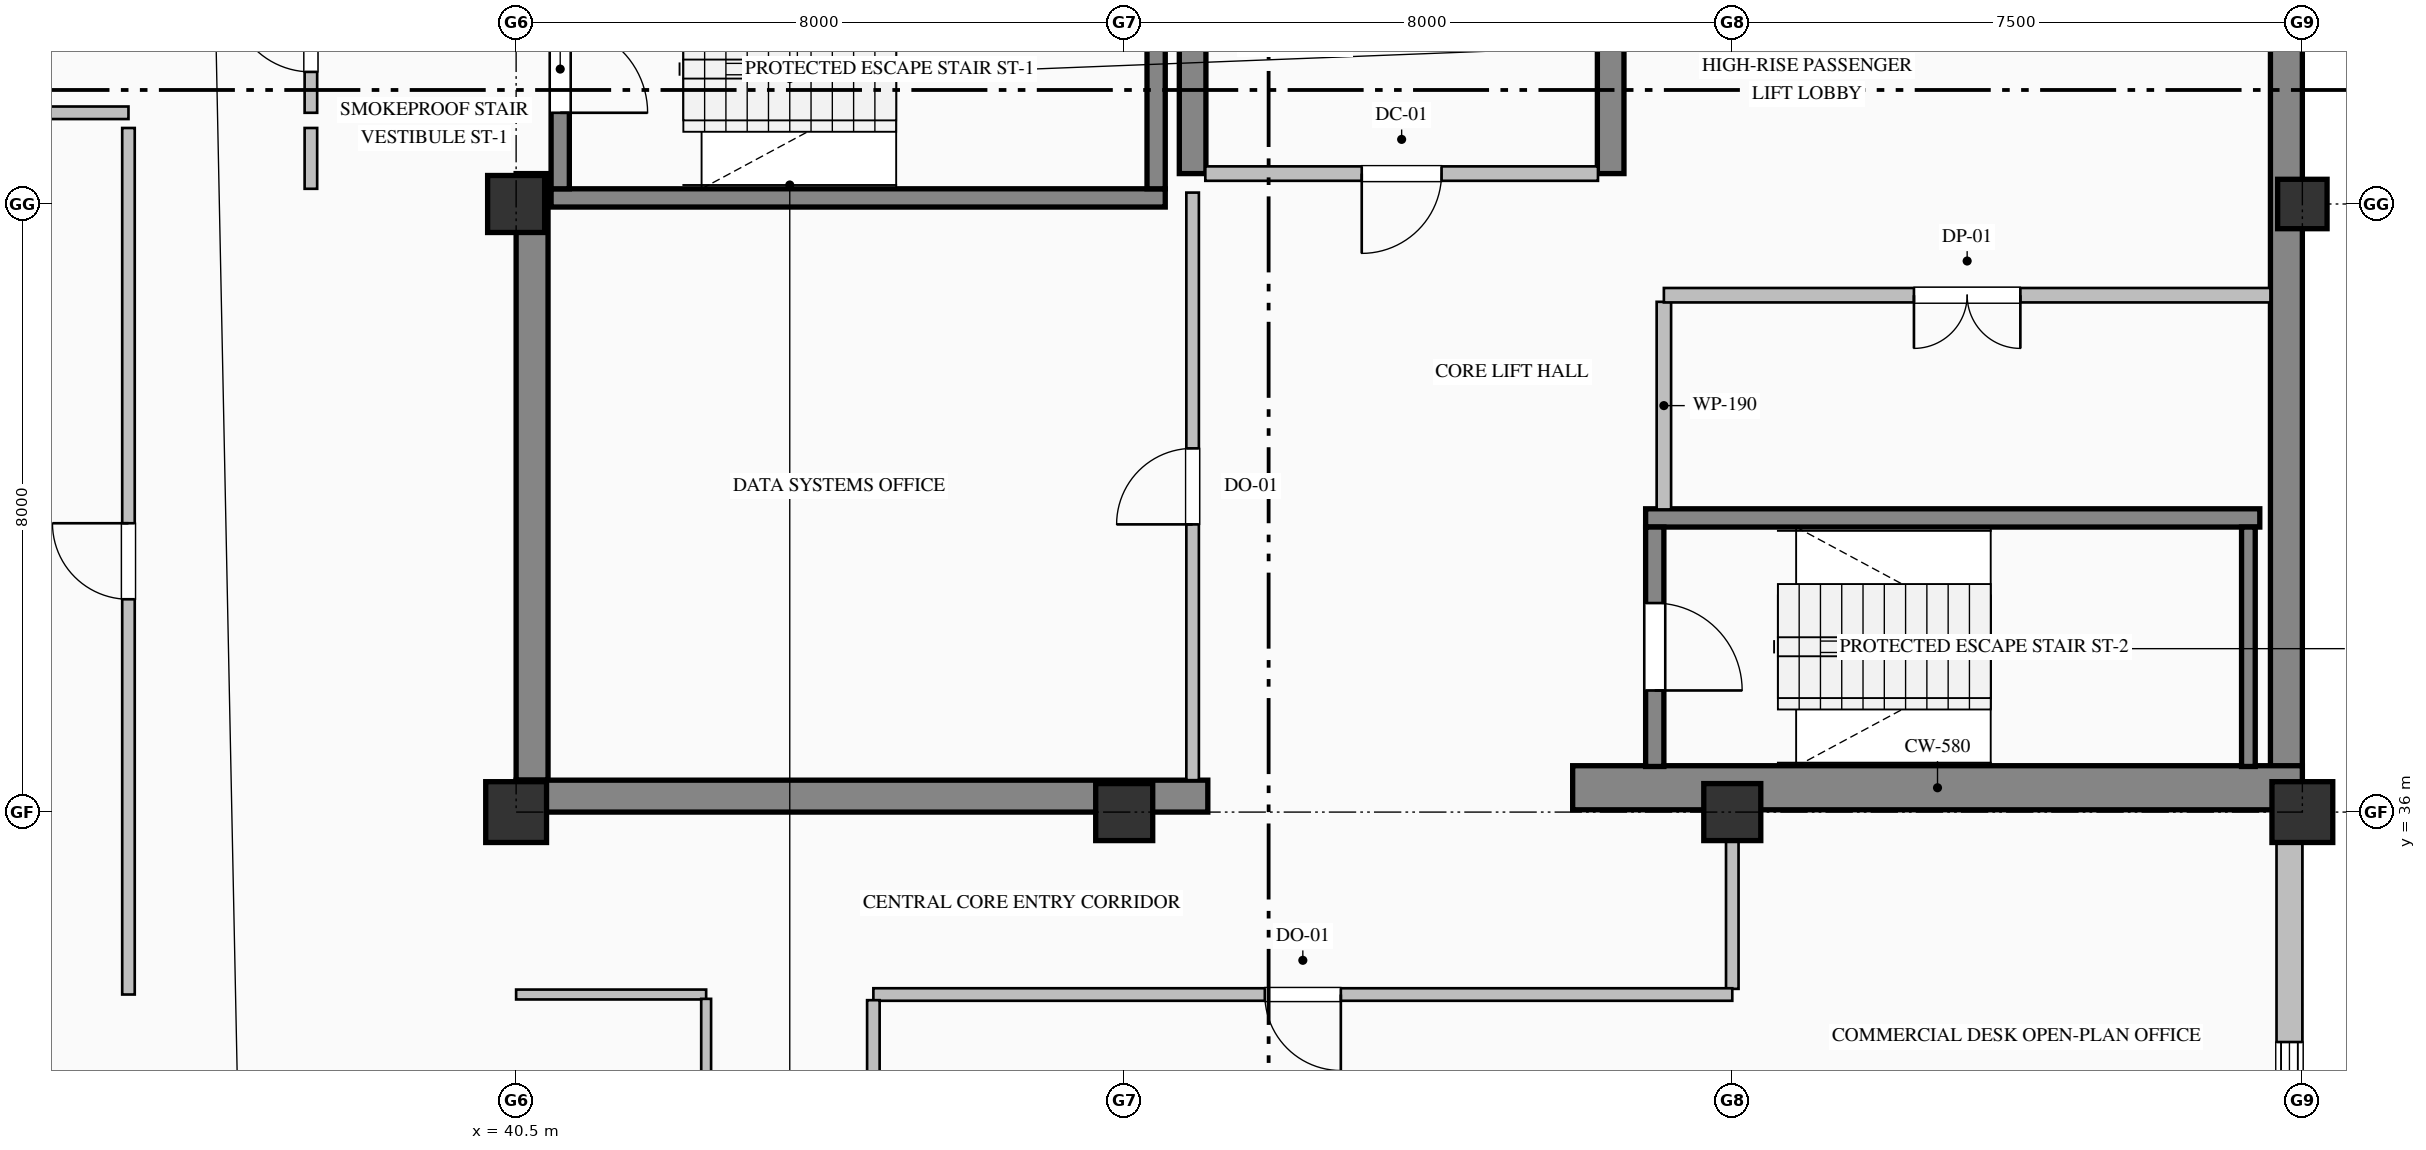
"""IFC4 building model, lengths in metres.
Left out: names, types, materials, properties, quantities, classifications, styles, units other than length and angle.
Written with IfcOpenShell. Run it as: python <this file> out.ifc"""

import sys

from ifc_helpers import new_model, si_unit, direction, frame, frame_2d, origin, origin_2d, place, context, subcontext, project, spatial, rectangle, hollow_rectangle, extrude, element, fill, save


model = new_model("IFC4")
c1 = context("Model", 3, precision=1e-05, world=origin(), true_north=direction((0.0, 1.0)))
c2 = subcontext(c1, "Body", "Model", "MODEL_VIEW")
j1 = project(units=[si_unit("LENGTHUNIT", "METRE"), si_unit("PLANEANGLEUNIT", "RADIAN")], contexts=[c1])
p1 = place(None, origin())
s1 = spatial("IfcSite", under=j1, at=p1, CompositionType="ELEMENT")
p2 = place(p1, origin())
s2 = spatial("IfcBuilding", under=s1, at=p2, CompositionType="ELEMENT")
p3 = place(p2, frame((0.0, 0.0, 351.2)))
s3 = spatial("IfcBuildingStorey", under=s2, at=p3, CompositionType="ELEMENT", Elevation=351.2)
p4 = place(p3, frame((63.79, 36.32, 0.0), z_axis=(0.0, 0.0, 1.0), x_axis=(0.0, 1.0, 0.0)))
e1 = element("IfcWall", 1, at=p4, inside=s3, PredefinedType="SHEAR", context=c2, shape_type="SweptSolid", body=[
    extrude(rectangle(XDim=15.26, YDim=0.42, at=frame_2d((7.63, 0.0))), origin(), (0.0, 0.0, 1.0), 3.785),
])
p5 = place(p3, frame((40.71, 36.42, 0.0), z_axis=(0.0, 0.0, 1.0), x_axis=(0.0, 1.0, 0.0)))
e2 = element("IfcWall", 2, at=p5, inside=s3, PredefinedType="SHEAR", context=c2, shape_type="SweptSolid", body=[
    extrude(rectangle(XDim=7.98, YDim=0.42, at=frame_2d((3.99, 0.0))), origin(), (0.0, 0.0, 1.0), 3.785),
])
p6 = place(p3, frame((40.5, 36.21, 0.0), z_axis=(0.0, 0.0, 1.0), x_axis=(1.0, 0.0, 0.0)))
e3 = element("IfcWall", 3, at=p6, inside=s3, PredefinedType="SHEAR", context=c2, shape_type="SweptSolid", body=[
    extrude(rectangle(XDim=9.1, YDim=0.42, at=frame_2d((4.55, 0.0))), origin(), (0.0, 0.0, 1.0), 3.785),
])
p7 = place(p3, frame((54.4, 36.32, 0.0), z_axis=(0.0, 0.0, 1.0), x_axis=(1.0, 0.0, 0.0)))
e4 = element("IfcWall", 4, at=p7, inside=s3, PredefinedType="SHEAR", context=c2, shape_type="SweptSolid", body=[
    extrude(rectangle(XDim=9.6, YDim=0.58, at=frame_2d((4.8, 0.0))), origin(), (0.0, 0.0, 1.0), 4.0),
])
p8 = place(p3, frame((49.4, 44.4, 0.0), z_axis=(0.0, 0.0, 1.0), x_axis=(0.0, 1.0, 0.0)))
e5 = element("IfcWall", 5, at=p8, inside=s3, PredefinedType="SHEAR", context=c2, shape_type="SweptSolid", body=[
    extrude(rectangle(XDim=3.0, YDim=0.35, at=frame_2d((1.5, 0.0))), origin(), (0.0, 0.0, 1.0), 3.785),
])
p9 = place(p3, frame((54.9, 44.4, 0.0), z_axis=(0.0, 0.0, 1.0), x_axis=(0.0, 1.0, 0.0)))
e6 = element("IfcWall", 6, at=p9, inside=s3, PredefinedType="SHEAR", context=c2, shape_type="SweptSolid", body=[
    extrude(rectangle(XDim=7.18, YDim=0.35, at=frame_2d((3.59, 0.0))), origin(), (0.0, 0.0, 1.0), 3.785),
])
p10 = place(p3, frame((40.5, 36.0, 0.0), z_axis=(0.0, 0.0, 1.0), x_axis=(1.0, 0.0, 0.0)))
e7 = element("IfcColumn", 7, at=p10, inside=s3, PredefinedType="COLUMN", context=c2, shape_type="SweptSolid", body=[
    extrude(hollow_rectangle(XDim=0.8, YDim=0.8, WallThickness=0.032, at=origin_2d()), origin(), (0.0, 0.0, 1.0), 4.0),
])
for number, where, z_axis, x_axis in (
    (8, (40.5, 44.0, 0.0), (0.0, 0.0, 1.0), (1.0, 0.0, 0.0)),
    (9, (48.5, 36.0, 0.0), (0.0, 0.0, 1.0), (1.0, 0.0, 0.0)),
    (10, (56.5, 36.0, 0.0), (0.0, 0.0, 1.0), (1.0, 0.0, 0.0)),
):
    element("IfcColumn", number, at=place(p3, frame(where, z_axis=z_axis, x_axis=x_axis)), inside=s3, PredefinedType="COLUMN", context=c2, shape_type="SweptSolid", body=[
        extrude(rectangle(XDim=0.75, YDim=0.75, at=origin_2d()), origin(), (0.0, 0.0, 1.0), 4.0),
    ])
p11 = place(p3, frame((64.0, 36.0, 0.0), z_axis=(0.0, 0.0, 1.0), x_axis=(1.0, 0.0, 0.0)))
e11 = element("IfcColumn", 11, at=p11, inside=s3, PredefinedType="COLUMN", context=c2, shape_type="SweptSolid", body=[
    extrude(hollow_rectangle(XDim=0.8, YDim=0.8, WallThickness=0.032, at=origin_2d()), origin(), (0.0, 0.0, 1.0), 4.0),
])
p12 = place(p3, frame((64.0, 44.0, 0.0), z_axis=(0.0, 0.0, 1.0), x_axis=(1.0, 0.0, 0.0)))
e12 = element("IfcColumn", 12, at=p12, inside=s3, PredefinedType="COLUMN", context=c2, shape_type="SweptSolid", body=[
    extrude(hollow_rectangle(XDim=0.65, YDim=0.65, WallThickness=0.028, at=origin_2d()), origin(), (0.0, 0.0, 1.0), 4.0),
])
p13 = place(p3, frame((63.83, 36.05, 0.0), z_axis=(0.0, 0.0, 1.0), x_axis=(0.0, -1.0, 0.0)))
e13 = element("IfcWall", 13, at=p13, inside=s3, PredefinedType="SOLIDWALL", context=c2, shape_type="SweptSolid", body=[
    extrude(rectangle(XDim=13.55, YDim=0.34, at=frame_2d((6.775, 0.0))), origin(), (0.0, 0.0, 1.0), 3.335),
])
p14 = place(p13, frame((3.075, 0.0, 0.8)))
e14 = element("IfcOpeningElement", 14, at=p14, cuts=e13, PredefinedType="OPENING", context=c2, shape_type="SweptSolid", body=[
    extrude(rectangle(XDim=1.05, YDim=2.15, at=frame_2d((0.525, 1.075))), frame((0.0, 0.18, 0.0), z_axis=(0.0, -1.0, 0.0), x_axis=(1.0, 0.0, 0.0)), (0.0, 0.0, 1.0), 0.36),
])
p15 = place(p3, frame((49.04, 44.08, 0.0), z_axis=(0.0, 0.0, 1.0), x_axis=(-1.0, 0.0, 0.0)))
e15 = element("IfcWall", 15, at=p15, inside=s3, PredefinedType="SOLIDWALL", context=c2, shape_type="SweptSolid", body=[
    extrude(rectangle(XDim=8.08, YDim=0.24, at=frame_2d((4.04, 0.0))), origin(), (0.0, 0.0, 1.0), 4.0),
])
p16 = place(p3, frame((41.08, 47.35, 0.0), z_axis=(0.0, 0.0, 1.0), x_axis=(0.0, -1.0, 0.0)))
e16 = element("IfcWall", 16, at=p16, inside=s3, PredefinedType="SOLIDWALL", context=c2, shape_type="SweptSolid", body=[
    extrude(rectangle(XDim=3.15, YDim=0.24, at=frame_2d((1.575, 0.0))), origin(), (0.0, 0.0, 1.0), 4.0),
])
p17 = place(p16, frame((1.0, 0.0, 0.0)))
e17 = element("IfcOpeningElement", 17, at=p17, cuts=e16, PredefinedType="OPENING", context=c2, shape_type="SweptSolid", body=[
    extrude(rectangle(XDim=1.15, YDim=2.2, at=frame_2d((0.575, 1.1))), frame((0.0, 0.13, 0.0), z_axis=(0.0, -1.0, 0.0), x_axis=(1.0, 0.0, 0.0)), (0.0, 0.0, 1.0), 0.26),
])
p18 = place(p3, frame((48.92, 44.2, 0.0), z_axis=(0.0, 0.0, 1.0), x_axis=(0.0, 1.0, 0.0)))
e18 = element("IfcWall", 18, at=p18, inside=s3, PredefinedType="SOLIDWALL", context=c2, shape_type="SweptSolid", body=[
    extrude(rectangle(XDim=3.15, YDim=0.24, at=frame_2d((1.575, 0.0))), origin(), (0.0, 0.0, 1.0), 4.0),
])
p19 = place(p3, frame((55.36, 39.87, 0.0), z_axis=(0.0, 0.0, 1.0), x_axis=(1.0, 0.0, 0.0)))
e19 = element("IfcWall", 19, at=p19, inside=s3, PredefinedType="SOLIDWALL", context=c2, shape_type="SweptSolid", body=[
    extrude(rectangle(XDim=8.08, YDim=0.24, at=frame_2d((4.04, 0.0))), origin(), (0.0, 0.0, 1.0), 4.0),
])
p20 = place(p3, frame((55.48, 39.75, 0.0), z_axis=(0.0, 0.0, 1.0), x_axis=(0.0, -1.0, 0.0)))
e20 = element("IfcWall", 20, at=p20, inside=s3, PredefinedType="SOLIDWALL", context=c2, shape_type="SweptSolid", body=[
    extrude(rectangle(XDim=3.15, YDim=0.24, at=frame_2d((1.575, 0.0))), origin(), (0.0, 0.0, 1.0), 4.0),
])
p21 = place(p20, frame((1.0, 0.0, 0.0)))
e21 = element("IfcOpeningElement", 21, at=p21, cuts=e20, PredefinedType="OPENING", context=c2, shape_type="SweptSolid", body=[
    extrude(rectangle(XDim=1.15, YDim=2.2, at=frame_2d((0.575, 1.1))), frame((0.0, 0.13, 0.0), z_axis=(0.0, -1.0, 0.0), x_axis=(1.0, 0.0, 0.0)), (0.0, 0.0, 1.0), 0.26),
])
p22 = place(p3, frame((63.29, 36.6, 0.0), z_axis=(0.0, 0.0, 1.0), x_axis=(0.0, 1.0, 0.0)))
e22 = element("IfcWall", 22, at=p22, inside=s3, PredefinedType="SOLIDWALL", context=c2, shape_type="SweptSolid", body=[
    extrude(rectangle(XDim=3.15, YDim=0.18, at=frame_2d((1.575, 0.0))), origin(), (0.0, 0.0, 1.0), 4.0),
])
p23 = place(p3, frame((37.8, 45.2, 0.0), z_axis=(0.0, 0.0, 1.0), x_axis=(0.0, 1.0, 0.0)))
e23 = element("IfcWall", 23, at=p23, inside=s3, PredefinedType="PARTITIONING", context=c2, shape_type="SweptSolid", body=[
    extrude(rectangle(XDim=2.125, YDim=0.165, at=frame_2d((1.063, 0.0))), origin(), (0.0, 0.0, 1.0), 3.785),
])
p24 = place(p23, frame((0.538, 0.0, 0.0)))
e24 = element("IfcOpeningElement", 24, at=p24, cuts=e23, PredefinedType="OPENING", context=c2, shape_type="SweptSolid", body=[
    extrude(rectangle(XDim=1.05, YDim=2.15, at=frame_2d((0.525, 1.075))), frame((0.0, 0.093, 0.0), z_axis=(0.0, -1.0, 0.0), x_axis=(1.0, 0.0, 0.0)), (0.0, 0.0, 1.0), 0.185),
])
p25 = place(p3, frame((37.8, 44.2, 0.0), z_axis=(0.0, 0.0, 1.0), x_axis=(0.0, 1.0, 0.0)))
e25 = element("IfcWall", 25, at=p25, inside=s3, PredefinedType="PARTITIONING", context=c2, shape_type="SweptSolid", body=[
    extrude(rectangle(XDim=0.8, YDim=0.165, at=frame_2d((0.4, 0.0))), origin(), (0.0, 0.0, 1.0), 3.785),
])
p26 = place(p3, frame((54.733, 44.4, 0.0), z_axis=(0.0, 0.0, 1.0), x_axis=(-1.0, 0.0, 0.0)))
e26 = element("IfcWall", 26, at=p26, inside=s3, PredefinedType="PARTITIONING", context=c2, shape_type="SweptSolid", body=[
    extrude(rectangle(XDim=5.166, YDim=0.19, at=frame_2d((2.583, 0.0))), origin(), (0.0, 0.0, 1.0), 3.785),
])
p27 = place(p26, frame((2.058, 0.0, 0.0)))
e27 = element("IfcOpeningElement", 27, at=p27, cuts=e26, PredefinedType="OPENING", context=c2, shape_type="SweptSolid", body=[
    extrude(rectangle(XDim=1.05, YDim=2.15, at=frame_2d((0.525, 1.075))), frame((0.0, 0.105, 0.0), z_axis=(0.0, -1.0, 0.0), x_axis=(1.0, 0.0, 0.0)), (0.0, 0.0, 1.0), 0.21),
])
p28 = place(p3, frame((49.4, 36.42, 0.0), z_axis=(0.0, 0.0, 1.0), x_axis=(0.0, 1.0, 0.0)))
e28 = element("IfcWall", 28, at=p28, inside=s3, PredefinedType="PARTITIONING", context=c2, shape_type="SweptSolid", body=[
    extrude(rectangle(XDim=7.73, YDim=0.165, at=frame_2d((3.865, 0.0))), origin(), (0.0, 0.0, 1.0), 3.027),
])
p29 = place(p28, frame((3.365, 0.0, 0.0)))
e29 = element("IfcOpeningElement", 29, at=p29, cuts=e28, PredefinedType="OPENING", context=c2, shape_type="SweptSolid", body=[
    extrude(rectangle(XDim=1.0, YDim=2.15, at=frame_2d((0.5, 1.075))), frame((0.0, 0.093, 0.0), z_axis=(0.0, -1.0, 0.0), x_axis=(1.0, 0.0, 0.0)), (0.0, 0.0, 1.0), 0.185),
])
p30 = place(p3, frame((55.6, 42.713, 0.0), z_axis=(0.0, 0.0, 1.0), x_axis=(0.0, -1.0, 0.0)))
e30 = element("IfcWall", 30, at=p30, inside=s3, PredefinedType="PARTITIONING", context=c2, shape_type="SweptSolid", body=[
    extrude(rectangle(XDim=2.731, YDim=0.19, at=frame_2d((1.365, 0.0))), origin(), (0.0, 0.0, 1.0), 3.785),
])
p31 = place(p3, frame((63.58, 42.8, 0.0), z_axis=(0.0, 0.0, 1.0), x_axis=(-1.0, 0.0, 0.0)))
e31 = element("IfcWall", 31, at=p31, inside=s3, PredefinedType="PARTITIONING", context=c2, shape_type="SweptSolid", body=[
    extrude(rectangle(XDim=7.98, YDim=0.19, at=frame_2d((3.99, 0.0))), origin(), (0.0, 0.0, 1.0), 3.785),
])
p32 = place(p31, frame((3.29, 0.0, 0.0)))
e32 = element("IfcOpeningElement", 32, at=p32, cuts=e31, PredefinedType="OPENING", context=c2, shape_type="SweptSolid", body=[
    extrude(rectangle(XDim=1.4, YDim=2.25, at=frame_2d((0.7, 1.125))), frame((0.0, 0.105, 0.0), z_axis=(0.0, -1.0, 0.0), x_axis=(1.0, 0.0, 0.0)), (0.0, 0.0, 1.0), 0.21),
])
p33 = place(p3, frame((35.4, 45.2, 0.0), z_axis=(0.0, 0.0, 1.0), x_axis=(-1.0, 0.0, 0.0)))
e33 = element("IfcWall", 33, at=p33, inside=s3, PredefinedType="PARTITIONING", context=c2, shape_type="SweptSolid", body=[
    extrude(rectangle(XDim=5.2, YDim=0.165, at=frame_2d((2.6, 0.0))), origin(), (0.0, 0.0, 1.0), 3.785),
])
p34 = place(p3, frame((35.4, 33.6, 0.0), z_axis=(0.0, 0.0, 1.0), x_axis=(0.0, 1.0, 0.0)))
e34 = element("IfcWall", 34, at=p34, inside=s3, PredefinedType="PARTITIONING", context=c2, shape_type="SweptSolid", body=[
    extrude(rectangle(XDim=11.4, YDim=0.165, at=frame_2d((5.7, 0.0))), origin(), (0.0, 0.0, 1.0), 3.785),
])
p35 = place(p34, frame((5.2, 0.0, 0.0)))
e35 = element("IfcOpeningElement", 35, at=p35, cuts=e34, PredefinedType="OPENING", context=c2, shape_type="SweptSolid", body=[
    extrude(rectangle(XDim=1.0, YDim=2.15, at=frame_2d((0.5, 1.075))), frame((0.0, 0.093, 0.0), z_axis=(0.0, -1.0, 0.0), x_axis=(1.0, 0.0, 0.0)), (0.0, 0.0, 1.0), 0.185),
])
p36 = place(p3, frame((56.5, 36.0, 0.0), z_axis=(0.0, 0.0, 1.0), x_axis=(0.0, -1.0, 0.0)))
e36 = element("IfcWall", 36, at=p36, inside=s3, PredefinedType="PARTITIONING", context=c2, shape_type="SweptSolid", body=[
    extrude(rectangle(XDim=2.325, YDim=0.165, at=frame_2d((1.163, 0.0))), origin(), (0.0, 0.0, 1.0), 3.177),
])
p37 = place(p3, frame((56.5, 33.6, 0.0), z_axis=(0.0, 0.0, 1.0), x_axis=(-1.0, 0.0, 0.0)))
e37 = element("IfcWall", 37, at=p37, inside=s3, PredefinedType="PARTITIONING", context=c2, shape_type="SweptSolid", body=[
    extrude(rectangle(XDim=11.3, YDim=0.165, at=frame_2d((5.65, 0.0))), origin(), (0.0, 0.0, 1.0), 3.785),
])
p38 = place(p37, frame((5.15, 0.0, 0.0)))
e38 = element("IfcOpeningElement", 38, at=p38, cuts=e37, PredefinedType="OPENING", context=c2, shape_type="SweptSolid", body=[
    extrude(rectangle(XDim=1.0, YDim=2.15, at=frame_2d((0.5, 1.075))), frame((0.0, 0.093, 0.0), z_axis=(0.0, -1.0, 0.0), x_axis=(1.0, 0.0, 0.0)), (0.0, 0.0, 1.0), 0.185),
])
p39 = place(p3, frame((43.0, 33.6, 0.0), z_axis=(0.0, 0.0, 1.0), x_axis=(-1.0, 0.0, 0.0)))
e39 = element("IfcWall", 39, at=p39, inside=s3, PredefinedType="PARTITIONING", context=c2, shape_type="SweptSolid", body=[
    extrude(rectangle(XDim=2.5, YDim=0.13, at=frame_2d((1.25, 0.0))), origin(), (0.0, 0.0, 1.0), 3.785),
])
p40 = place(p3, frame((45.2, 33.525, 0.0), z_axis=(0.0, 0.0, 1.0), x_axis=(0.0, -1.0, 0.0)))
e40 = element("IfcWall", 40, at=p40, inside=s3, PredefinedType="PARTITIONING", context=c2, shape_type="SweptSolid", body=[
    extrude(rectangle(XDim=3.528, YDim=0.165, at=frame_2d((1.764, 0.0))), origin(), (0.0, 0.0, 1.0), 3.785),
])
p41 = place(p3, frame((43.0, 22.875, 0.0), z_axis=(0.0, 0.0, 1.0), x_axis=(0.0, 1.0, 0.0)))
e41 = element("IfcWall", 41, at=p41, inside=s3, PredefinedType="PARTITIONING", context=c2, shape_type="SweptSolid", body=[
    extrude(rectangle(XDim=10.668, YDim=0.13, at=frame_2d((5.334, 0.0))), origin(), (0.0, 0.0, 1.0), 3.785),
])
p42 = place(p41, frame((4.834, 0.0, 0.0)))
e42 = element("IfcOpeningElement", 42, at=p42, cuts=e41, PredefinedType="OPENING", context=c2, shape_type="SweptSolid", body=[
    extrude(rectangle(XDim=1.0, YDim=2.15, at=frame_2d((0.5, 1.075))), frame((0.0, 0.075, 0.0), z_axis=(0.0, -1.0, 0.0), x_axis=(1.0, 0.0, 0.0)), (0.0, 0.0, 1.0), 0.15),
])
p43 = place(p14, origin())
e43 = element("IfcWindow", 43, at=p43, inside=s3, PartitioningType="SINGLE_PANEL", PredefinedType="WINDOW", context=c2, shape_type="SweptSolid", body=[
    extrude(rectangle(XDim=1.05, YDim=2.15, at=frame_2d((0.525, 1.075))), frame((0.0, 0.15, 0.0), z_axis=(0.0, -1.0, 0.0), x_axis=(1.0, 0.0, 0.0)), (0.0, 0.0, 1.0), 0.06),
])
fill(e14, e43)
p44 = place(p17, origin())
e44 = element("IfcDoor", 44, at=p44, inside=s3, OperationType="SINGLE_SWING_RIGHT", PredefinedType="DOOR", context=c2, shape_type="SweptSolid", body=[
    extrude(rectangle(XDim=1.15, YDim=2.2, at=frame_2d((0.575, 1.1))), frame((0.0, 0.025, 0.0), z_axis=(0.0, -1.0, 0.0), x_axis=(1.0, 0.0, 0.0)), (0.0, 0.0, 1.0), 0.05),
])
fill(e17, e44)
p45 = place(p21, origin())
e45 = element("IfcDoor", 45, at=p45, inside=s3, OperationType="SINGLE_SWING_RIGHT", PredefinedType="DOOR", context=c2, shape_type="SweptSolid", body=[
    extrude(rectangle(XDim=1.15, YDim=2.2, at=frame_2d((0.575, 1.1))), frame((0.0, 0.025, 0.0), z_axis=(0.0, -1.0, 0.0), x_axis=(1.0, 0.0, 0.0)), (0.0, 0.0, 1.0), 0.05),
])
fill(e21, e45)
p46 = place(p27, origin())
e46 = element("IfcDoor", 46, at=p46, inside=s3, OperationType="SINGLE_SWING_RIGHT", PredefinedType="DOOR", context=c2, shape_type="SweptSolid", body=[
    extrude(rectangle(XDim=1.05, YDim=2.15, at=frame_2d((0.525, 1.075))), frame((0.0, 0.025, 0.0), z_axis=(0.0, -1.0, 0.0), x_axis=(1.0, 0.0, 0.0)), (0.0, 0.0, 1.0), 0.05),
])
fill(e27, e46)
p47 = place(p24, origin())
e47 = element("IfcDoor", 47, at=p47, inside=s3, OperationType="SINGLE_SWING_RIGHT", PredefinedType="DOOR", context=c2, shape_type="SweptSolid", body=[
    extrude(rectangle(XDim=1.05, YDim=2.15, at=frame_2d((0.525, 1.075))), frame((0.0, 0.025, 0.0), z_axis=(0.0, -1.0, 0.0), x_axis=(1.0, 0.0, 0.0)), (0.0, 0.0, 1.0), 0.05),
])
fill(e24, e47)
p48 = place(p29, origin())
e48 = element("IfcDoor", 48, at=p48, inside=s3, OperationType="SINGLE_SWING_LEFT", PredefinedType="DOOR", context=c2, shape_type="SweptSolid", body=[
    extrude(rectangle(XDim=1.0, YDim=2.15, at=frame_2d((0.5, 1.075))), frame((0.0, 0.025, 0.0), z_axis=(0.0, -1.0, 0.0), x_axis=(1.0, 0.0, 0.0)), (0.0, 0.0, 1.0), 0.05),
])
fill(e29, e48)
p49 = place(p32, origin())
e49 = element("IfcDoor", 49, at=p49, inside=s3, OperationType="DOUBLE_DOOR_SINGLE_SWING", PredefinedType="DOOR", context=c2, shape_type="SweptSolid", body=[
    extrude(rectangle(XDim=1.4, YDim=2.25, at=frame_2d((0.7, 1.125))), frame((0.0, 0.025, 0.0), z_axis=(0.0, -1.0, 0.0), x_axis=(1.0, 0.0, 0.0)), (0.0, 0.0, 1.0), 0.05),
])
fill(e32, e49)
p50 = place(p38, origin())
e50 = element("IfcDoor", 50, at=p50, inside=s3, OperationType="SINGLE_SWING_LEFT", PredefinedType="DOOR", context=c2, shape_type="SweptSolid", body=[
    extrude(rectangle(XDim=1.0, YDim=2.15, at=frame_2d((0.5, 1.075))), frame((0.0, 0.025, 0.0), z_axis=(0.0, -1.0, 0.0), x_axis=(1.0, 0.0, 0.0)), (0.0, 0.0, 1.0), 0.05),
])
fill(e38, e50)
p51 = place(p35, origin())
e51 = element("IfcDoor", 51, at=p51, inside=s3, OperationType="SINGLE_SWING_RIGHT", PredefinedType="DOOR", context=c2, shape_type="SweptSolid", body=[
    extrude(rectangle(XDim=1.0, YDim=2.15, at=frame_2d((0.5, 1.075))), frame((0.0, 0.025, 0.0), z_axis=(0.0, -1.0, 0.0), x_axis=(1.0, 0.0, 0.0)), (0.0, 0.0, 1.0), 0.05),
])
fill(e35, e51)
save(model, sys.argv[1])
